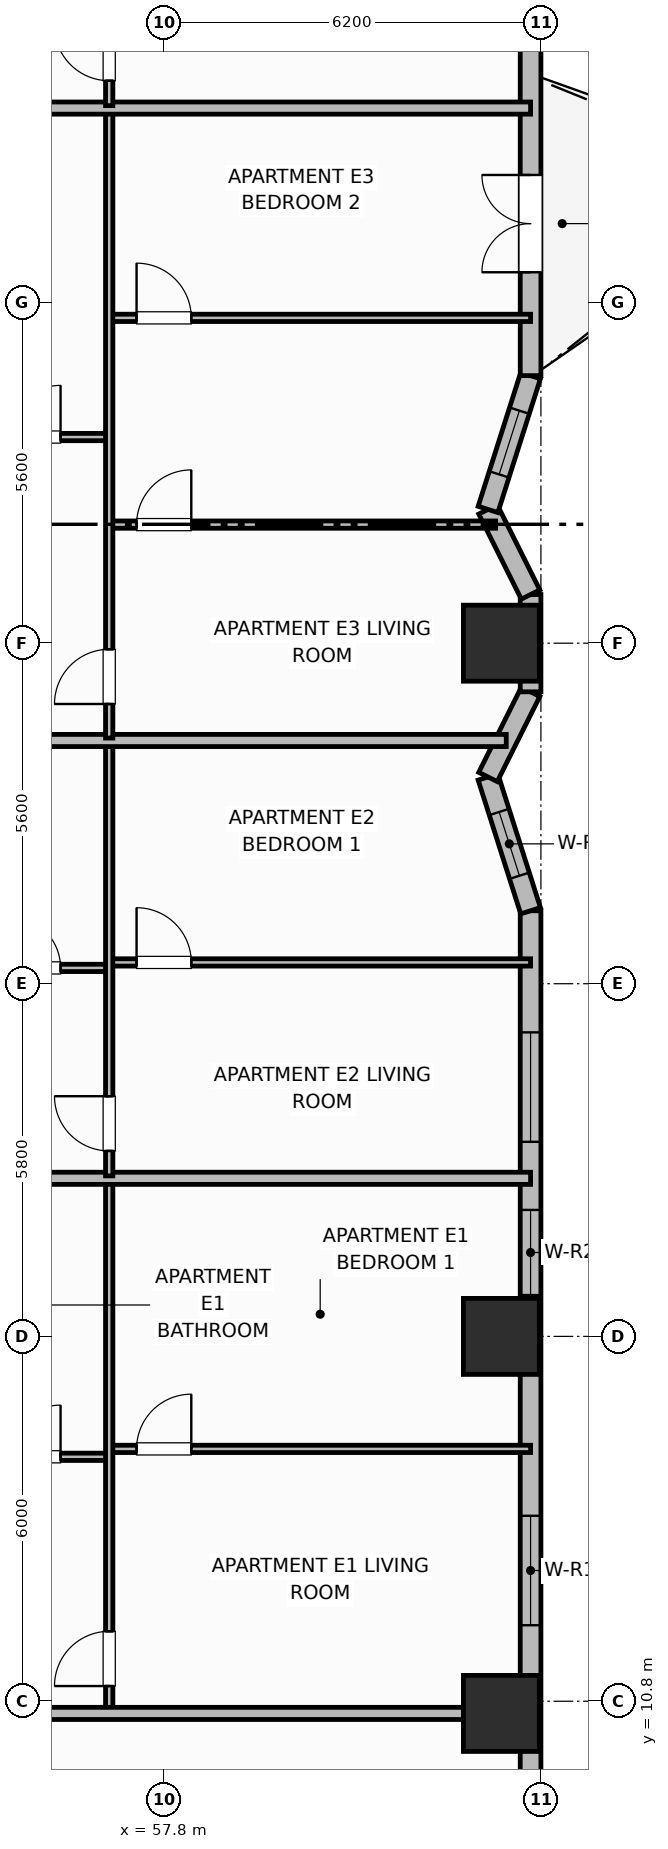
"""IFC4 building model, lengths in metres.
Left out: names, types, materials, properties, quantities, classifications, styles, units other than length and angle.
Written with IfcOpenShell. Run it as: python <this file> out.ifc"""

import sys

from ifc_helpers import new_model, si_unit, direction, frame, frame_2d, origin, origin_2d, place, context, subcontext, project, spatial, rectangle, extrude, element, fill, save


model = new_model("IFC4")
c1 = context("Model", 3, precision=1e-05, world=origin(), true_north=direction((0.0, 1.0)))
c2 = subcontext(c1, "Body", "Model", "MODEL_VIEW")
j1 = project(units=[si_unit("LENGTHUNIT", "METRE"), si_unit("PLANEANGLEUNIT", "RADIAN")], contexts=[c1])
p1 = place(None, origin())
s1 = spatial("IfcSite", under=j1, at=p1, CompositionType="ELEMENT")
p2 = place(p1, origin())
s2 = spatial("IfcBuilding", under=s1, at=p2, CompositionType="ELEMENT")
p3 = place(p2, frame((0.0, 0.0, 58.4)))
s3 = spatial("IfcBuildingStorey", under=s2, at=p3, CompositionType="ELEMENT", Elevation=58.4)
for number, where, z_axis, x_axis in (
    (1, (63.35, 10.6, 0.0), (0.0, 0.0, 1.0), (1.0, 0.0, 0.0)),
    (2, (63.35, 16.8, 0.0), (0.0, 0.0, 1.0), (1.0, 0.0, 0.0)),
    (3, (63.35, 28.2, 0.0), (0.0, 0.0, 1.0), (1.0, 0.0, 0.0)),
):
    element("IfcColumn", number, at=place(p3, frame(where, z_axis=z_axis, x_axis=x_axis)), inside=s3, PredefinedType="COLUMN", context=c2, shape_type="SweptSolid", body=[
        extrude(rectangle(XDim=1.25, YDim=1.25, at=origin_2d()), origin(), (0.0, 0.0, 1.0), 3.7),
    ])
p4 = place(p3, frame((63.83, 9.0, 0.0), z_axis=(0.0, 0.0, 1.0), x_axis=(0.0, 1.0, 0.0)))
e4 = element("IfcWall", 4, at=p4, inside=s3, PredefinedType="SOLIDWALL", context=c2, shape_type="SweptSolid", body=[
    extrude(rectangle(XDim=14.8, YDim=0.34, at=frame_2d((7.4, 0.0))), origin(), (0.0, 0.0, 1.0), 2.7),
])
p5 = place(p4, frame((3.05, 0.0, 0.73)))
e5 = element("IfcOpeningElement", 5, at=p5, cuts=e4, PredefinedType="OPENING", context=c2, shape_type="SweptSolid", body=[
    extrude(rectangle(XDim=1.8, YDim=1.85, at=frame_2d((0.9, 0.925))), frame((0.0, 0.18, 0.0), z_axis=(0.0, -1.0, 0.0), x_axis=(1.0, 0.0, 0.0)), (0.0, 0.0, 1.0), 0.36),
])
p6 = place(p4, frame((8.48, 0.0, 0.69)))
e6 = element("IfcOpeningElement", 6, at=p6, cuts=e4, PredefinedType="OPENING", context=c2, shape_type="SweptSolid", body=[
    extrude(rectangle(XDim=1.4, YDim=1.85, at=frame_2d((0.7, 0.925))), frame((0.0, 0.18, 0.0), z_axis=(0.0, -1.0, 0.0), x_axis=(1.0, 0.0, 0.0)), (0.0, 0.0, 1.0), 0.36),
])
p7 = place(p4, frame((11.0, 0.0, 0.73)))
e7 = element("IfcOpeningElement", 7, at=p7, cuts=e4, PredefinedType="OPENING", context=c2, shape_type="SweptSolid", body=[
    extrude(rectangle(XDim=1.8, YDim=1.85, at=frame_2d((0.9, 0.925))), frame((0.0, 0.18, 0.0), z_axis=(0.0, -1.0, 0.0), x_axis=(1.0, 0.0, 0.0)), (0.0, 0.0, 1.0), 0.36),
])
p8 = place(p3, frame((63.83, 23.8, 0.0), z_axis=(0.0, 0.0, 1.0), x_axis=(-0.303286588318, 0.95289938889, 0.0)))
e8 = element("IfcWall", 8, at=p8, inside=s3, PredefinedType="SOLIDWALL", context=c2, shape_type="SweptSolid", body=[
    extrude(rectangle(XDim=2.309, YDim=0.34, at=frame_2d((1.154, 0.0))), origin(), (0.0, 0.0, 1.0), 2.7),
])
p9 = place(p8, frame((0.604, 0.0, 0.89)))
e9 = element("IfcOpeningElement", 9, at=p9, cuts=e8, PredefinedType="OPENING", context=c2, shape_type="SweptSolid", body=[
    extrude(rectangle(XDim=1.1, YDim=1.65, at=frame_2d((0.55, 0.825))), frame((0.0, 0.18, 0.0), z_axis=(0.0, -1.0, 0.0), x_axis=(1.0, 0.0, 0.0)), (0.0, 0.0, 1.0), 0.36),
])
p10 = place(p3, frame((63.13, 26.0, 0.0), z_axis=(0.0, 0.0, 1.0), x_axis=(0.447338371726, 0.894364792007, 0.0)))
e10 = element("IfcWall", 10, at=p10, inside=s3, PredefinedType="SOLIDWALL", context=c2, shape_type="SweptSolid", body=[
    extrude(rectangle(XDim=1.565, YDim=0.34, at=frame_2d((0.783, 0.0))), origin(), (0.0, 0.0, 1.0), 2.7),
])
p11 = place(p3, frame((63.83, 27.4, 0.0), z_axis=(0.0, 0.0, 1.0), x_axis=(0.0, 1.0, 0.0)))
e11 = element("IfcWall", 11, at=p11, inside=s3, PredefinedType="SOLIDWALL", context=c2, shape_type="SweptSolid", body=[
    extrude(rectangle(XDim=1.6, YDim=0.34, at=frame_2d((0.8, 0.0))), origin(), (0.0, 0.0, 1.0), 2.7),
])
p12 = place(p3, frame((63.83, 29.0, 0.0), z_axis=(0.0, 0.0, 1.0), x_axis=(-0.447338371726, 0.894364792007, 0.0)))
e12 = element("IfcWall", 12, at=p12, inside=s3, PredefinedType="SOLIDWALL", context=c2, shape_type="SweptSolid", body=[
    extrude(rectangle(XDim=1.565, YDim=0.34, at=frame_2d((0.783, 0.0))), origin(), (0.0, 0.0, 1.0), 2.7),
])
p13 = place(p3, frame((63.13, 30.4, 0.0), z_axis=(0.0, 0.0, 1.0), x_axis=(0.303256029766, 0.952909114454, 0.0)))
e13 = element("IfcWall", 13, at=p13, inside=s3, PredefinedType="SOLIDWALL", context=c2, shape_type="SweptSolid", body=[
    extrude(rectangle(XDim=2.309, YDim=0.34, at=frame_2d((1.154, 0.0))), origin(), (0.0, 0.0, 1.0), 2.7),
])
p14 = place(p13, frame((0.604, 0.0, 0.89)))
e14 = element("IfcOpeningElement", 14, at=p14, cuts=e13, PredefinedType="OPENING", context=c2, shape_type="SweptSolid", body=[
    extrude(rectangle(XDim=1.1, YDim=1.65, at=frame_2d((0.55, 0.825))), frame((0.0, 0.18, 0.0), z_axis=(0.0, -1.0, 0.0), x_axis=(1.0, 0.0, 0.0)), (0.0, 0.0, 1.0), 0.36),
])
p15 = place(p3, frame((63.83, 32.6, 0.0), z_axis=(0.0, 0.0, 1.0), x_axis=(0.0, 1.0, 0.0)))
e15 = element("IfcWall", 15, at=p15, inside=s3, PredefinedType="SOLIDWALL", context=c2, shape_type="SweptSolid", body=[
    extrude(rectangle(XDim=14.8, YDim=0.34, at=frame_2d((7.4, 0.0))), origin(), (0.0, 0.0, 1.0), 2.7),
])
p16 = place(p15, frame((1.7, 0.0, 0.0)))
e16 = element("IfcOpeningElement", 16, at=p16, cuts=e15, PredefinedType="OPENING", context=c2, shape_type="SweptSolid", body=[
    extrude(rectangle(XDim=1.6, YDim=2.1, at=frame_2d((0.8, 1.05))), frame((0.0, 0.18, 0.0), z_axis=(0.0, -1.0, 0.0), x_axis=(1.0, 0.0, 0.0)), (0.0, 0.0, 1.0), 0.36),
])
p17 = place(p15, frame((9.337, 0.0, 0.68)))
e17 = element("IfcOpeningElement", 17, at=p17, cuts=e15, PredefinedType="OPENING", context=c2, shape_type="SweptSolid", body=[
    extrude(rectangle(XDim=1.6, YDim=1.9, at=frame_2d((0.8, 0.95))), frame((0.0, 0.18, 0.0), z_axis=(0.0, -1.0, 0.0), x_axis=(1.0, 0.0, 0.0)), (0.0, 0.0, 1.0), 0.36),
])
p18 = place(p3, frame((54.65, 14.82, 0.0), z_axis=(0.0, 0.0, 1.0), x_axis=(1.0, 0.0, 0.0)))
e18 = element("IfcWall", 18, at=p18, inside=s3, PredefinedType="PARTITIONING", context=c2, shape_type="SweptSolid", body=[
    extrude(rectangle(XDim=2.25, YDim=0.12, at=frame_2d((1.125, 0.0))), origin(), (0.0, 0.0, 1.0), 2.53),
])
p19 = place(p18, frame((0.6, 0.0, 0.0)))
e19 = element("IfcOpeningElement", 19, at=p19, cuts=e18, PredefinedType="OPENING", context=c2, shape_type="SweptSolid", body=[
    extrude(rectangle(XDim=0.85, YDim=2.1, at=frame_2d((0.425, 1.05))), frame((0.0, 0.07, 0.0), z_axis=(0.0, -1.0, 0.0), x_axis=(1.0, 0.0, 0.0)), (0.0, 0.0, 1.0), 0.14),
])
p20 = place(p3, frame((56.9, 14.95, 0.0), z_axis=(0.0, 0.0, 1.0), x_axis=(1.0, 0.0, 0.0)))
e20 = element("IfcWall", 20, at=p20, inside=s3, PredefinedType="PARTITIONING", context=c2, shape_type="SweptSolid", body=[
    extrude(rectangle(XDim=6.93, YDim=0.12, at=frame_2d((3.465, 0.0))), origin(), (0.0, 0.0, 1.0), 2.53),
])
p21 = place(p20, frame((0.45, 0.0, 0.0)))
e21 = element("IfcOpeningElement", 21, at=p21, cuts=e20, PredefinedType="OPENING", context=c2, shape_type="SweptSolid", body=[
    extrude(rectangle(XDim=0.9, YDim=2.1, at=frame_2d((0.45, 1.05))), frame((0.0, 0.07, 0.0), z_axis=(0.0, -1.0, 0.0), x_axis=(1.0, 0.0, 0.0)), (0.0, 0.0, 1.0), 0.14),
])
p22 = place(p3, frame((56.9, 10.64, 0.0), z_axis=(0.0, 0.0, 1.0), x_axis=(0.0, 1.0, 0.0)))
e22 = element("IfcWall", 22, at=p22, inside=s3, PredefinedType="PARTITIONING", context=c2, shape_type="SweptSolid", body=[
    extrude(rectangle(XDim=8.72, YDim=0.12, at=frame_2d((4.36, 0.0))), origin(), (0.0, 0.0, 1.0), 2.53),
])
p23 = place(p22, frame((0.41, 0.0, 0.0)))
e23 = element("IfcOpeningElement", 23, at=p23, cuts=e22, PredefinedType="OPENING", context=c2, shape_type="SweptSolid", body=[
    extrude(rectangle(XDim=0.9, YDim=2.1, at=frame_2d((0.45, 1.05))), frame((0.0, 0.07, 0.0), z_axis=(0.0, -1.0, 0.0), x_axis=(1.0, 0.0, 0.0)), (0.0, 0.0, 1.0), 0.14),
])
p24 = place(p3, frame((54.65, 19.4, 0.0), z_axis=(0.0, 0.0, 1.0), x_axis=(1.0, 0.0, 0.0)))
e24 = element("IfcWall", 24, at=p24, inside=s3, PredefinedType="PARTITIONING", context=c2, shape_type="SweptSolid", body=[
    extrude(rectangle(XDim=9.18, YDim=0.2, at=frame_2d((4.59, 0.0))), origin(), (0.0, 0.0, 1.0), 2.53),
])
p25 = place(p3, frame((54.65, 22.86, 0.0), z_axis=(0.0, 0.0, 1.0), x_axis=(1.0, 0.0, 0.0)))
e25 = element("IfcWall", 25, at=p25, inside=s3, PredefinedType="PARTITIONING", context=c2, shape_type="SweptSolid", body=[
    extrude(rectangle(XDim=2.25, YDim=0.12, at=frame_2d((1.125, 0.0))), origin(), (0.0, 0.0, 1.0), 2.53),
])
p26 = place(p25, frame((0.6, 0.0, 0.0)))
e26 = element("IfcOpeningElement", 26, at=p26, cuts=e25, PredefinedType="OPENING", context=c2, shape_type="SweptSolid", body=[
    extrude(rectangle(XDim=0.85, YDim=2.1, at=frame_2d((0.425, 1.05))), frame((0.0, 0.07, 0.0), z_axis=(0.0, -1.0, 0.0), x_axis=(1.0, 0.0, 0.0)), (0.0, 0.0, 1.0), 0.14),
])
p27 = place(p3, frame((56.9, 22.95, 0.0), z_axis=(0.0, 0.0, 1.0), x_axis=(1.0, 0.0, 0.0)))
e27 = element("IfcWall", 27, at=p27, inside=s3, PredefinedType="PARTITIONING", context=c2, shape_type="SweptSolid", body=[
    extrude(rectangle(XDim=6.93, YDim=0.12, at=frame_2d((3.465, 0.0))), origin(), (0.0, 0.0, 1.0), 2.53),
])
p28 = place(p27, frame((0.45, 0.0, 0.0)))
e28 = element("IfcOpeningElement", 28, at=p28, cuts=e27, PredefinedType="OPENING", context=c2, shape_type="SweptSolid", body=[
    extrude(rectangle(XDim=0.9, YDim=2.1, at=frame_2d((0.45, 1.05))), frame((0.0, 0.07, 0.0), z_axis=(0.0, -1.0, 0.0), x_axis=(1.0, 0.0, 0.0)), (0.0, 0.0, 1.0), 0.14),
])
p29 = place(p3, frame((56.9, 19.44, 0.0), z_axis=(0.0, 0.0, 1.0), x_axis=(0.0, 1.0, 0.0)))
e29 = element("IfcWall", 29, at=p29, inside=s3, PredefinedType="PARTITIONING", context=c2, shape_type="SweptSolid", body=[
    extrude(rectangle(XDim=7.12, YDim=0.12, at=frame_2d((3.56, 0.0))), origin(), (0.0, 0.0, 1.0), 2.53),
])
p30 = place(p29, frame((0.41, 0.0, 0.0)))
e30 = element("IfcOpeningElement", 30, at=p30, cuts=e29, PredefinedType="OPENING", context=c2, shape_type="SweptSolid", body=[
    extrude(rectangle(XDim=0.9, YDim=2.1, at=frame_2d((0.45, 1.05))), frame((0.0, 0.07, 0.0), z_axis=(0.0, -1.0, 0.0), x_axis=(1.0, 0.0, 0.0)), (0.0, 0.0, 1.0), 0.14),
])
p31 = place(p3, frame((54.65, 26.6, 0.0), z_axis=(0.0, 0.0, 1.0), x_axis=(1.0, 0.0, 0.0)))
e31 = element("IfcWall", 31, at=p31, inside=s3, PredefinedType="PARTITIONING", context=c2, shape_type="SweptSolid", body=[
    extrude(rectangle(XDim=8.78, YDim=0.2, at=frame_2d((4.39, 0.0))), origin(), (0.0, 0.0, 1.0), 2.53),
])
p32 = place(p3, frame((54.65, 31.59, 0.0), z_axis=(0.0, 0.0, 1.0), x_axis=(1.0, 0.0, 0.0)))
e32 = element("IfcWall", 32, at=p32, inside=s3, PredefinedType="PARTITIONING", context=c2, shape_type="SweptSolid", body=[
    extrude(rectangle(XDim=2.25, YDim=0.12, at=frame_2d((1.125, 0.0))), origin(), (0.0, 0.0, 1.0), 2.53),
])
p33 = place(p32, frame((0.6, 0.0, 0.0)))
e33 = element("IfcOpeningElement", 33, at=p33, cuts=e32, PredefinedType="OPENING", context=c2, shape_type="SweptSolid", body=[
    extrude(rectangle(XDim=0.85, YDim=2.1, at=frame_2d((0.425, 1.05))), frame((0.0, 0.07, 0.0), z_axis=(0.0, -1.0, 0.0), x_axis=(1.0, 0.0, 0.0)), (0.0, 0.0, 1.0), 0.14),
])
p34 = place(p3, frame((56.9, 30.15, 0.0), z_axis=(0.0, 0.0, 1.0), x_axis=(1.0, 0.0, 0.0)))
e34 = element("IfcWall", 34, at=p34, inside=s3, PredefinedType="PARTITIONING", context=c2, shape_type="SweptSolid", body=[
    extrude(rectangle(XDim=6.355, YDim=0.12, at=frame_2d((3.177, 0.0))), origin(), (0.0, 0.0, 1.0), 2.53),
])
p35 = place(p34, frame((0.45, 0.0, 0.0)))
e35 = element("IfcOpeningElement", 35, at=p35, cuts=e34, PredefinedType="OPENING", context=c2, shape_type="SweptSolid", body=[
    extrude(rectangle(XDim=0.9, YDim=2.1, at=frame_2d((0.45, 1.05))), frame((0.0, 0.07, 0.0), z_axis=(0.0, -1.0, 0.0), x_axis=(1.0, 0.0, 0.0)), (0.0, 0.0, 1.0), 0.14),
])
p36 = place(p3, frame((56.9, 33.55, 0.0), z_axis=(0.0, 0.0, 1.0), x_axis=(1.0, 0.0, 0.0)))
e36 = element("IfcWall", 36, at=p36, inside=s3, PredefinedType="PARTITIONING", context=c2, shape_type="SweptSolid", body=[
    extrude(rectangle(XDim=6.93, YDim=0.12, at=frame_2d((3.465, 0.0))), origin(), (0.0, 0.0, 1.0), 2.53),
])
p37 = place(p36, frame((0.45, 0.0, 0.0)))
e37 = element("IfcOpeningElement", 37, at=p37, cuts=e36, PredefinedType="OPENING", context=c2, shape_type="SweptSolid", body=[
    extrude(rectangle(XDim=0.9, YDim=2.1, at=frame_2d((0.45, 1.05))), frame((0.0, 0.07, 0.0), z_axis=(0.0, -1.0, 0.0), x_axis=(1.0, 0.0, 0.0)), (0.0, 0.0, 1.0), 0.14),
])
p38 = place(p3, frame((56.9, 26.64, 0.0), z_axis=(0.0, 0.0, 1.0), x_axis=(0.0, 1.0, 0.0)))
e38 = element("IfcWall", 38, at=p38, inside=s3, PredefinedType="PARTITIONING", context=c2, shape_type="SweptSolid", body=[
    extrude(rectangle(XDim=10.32, YDim=0.12, at=frame_2d((5.16, 0.0))), origin(), (0.0, 0.0, 1.0), 2.53),
])
p39 = place(p38, frame((0.56, 0.0, 0.0)))
e39 = element("IfcOpeningElement", 39, at=p39, cuts=e38, PredefinedType="OPENING", context=c2, shape_type="SweptSolid", body=[
    extrude(rectangle(XDim=0.9, YDim=2.1, at=frame_2d((0.45, 1.05))), frame((0.0, 0.07, 0.0), z_axis=(0.0, -1.0, 0.0), x_axis=(1.0, 0.0, 0.0)), (0.0, 0.0, 1.0), 0.14),
])
p40 = place(p3, frame((54.65, 37.0, 0.0), z_axis=(0.0, 0.0, 1.0), x_axis=(1.0, 0.0, 0.0)))
e40 = element("IfcWall", 40, at=p40, inside=s3, PredefinedType="PARTITIONING", context=c2, shape_type="SweptSolid", body=[
    extrude(rectangle(XDim=9.18, YDim=0.2, at=frame_2d((4.59, 0.0))), origin(), (0.0, 0.0, 1.0), 2.53),
])
p41 = place(p3, frame((56.9, 37.04, 0.0), z_axis=(0.0, 0.0, 1.0), x_axis=(0.0, 1.0, 0.0)))
e41 = element("IfcWall", 41, at=p41, inside=s3, PredefinedType="PARTITIONING", context=c2, shape_type="SweptSolid", body=[
    extrude(rectangle(XDim=8.72, YDim=0.12, at=frame_2d((4.36, 0.0))), origin(), (0.0, 0.0, 1.0), 2.53),
])
p42 = place(p41, frame((0.41, 0.0, 0.0)))
e42 = element("IfcOpeningElement", 42, at=p42, cuts=e41, PredefinedType="OPENING", context=c2, shape_type="SweptSolid", body=[
    extrude(rectangle(XDim=0.9, YDim=2.1, at=frame_2d((0.45, 1.05))), frame((0.0, 0.07, 0.0), z_axis=(0.0, -1.0, 0.0), x_axis=(1.0, 0.0, 0.0)), (0.0, 0.0, 1.0), 0.14),
])
p43 = place(p3, frame((54.65, 10.6, 0.0), z_axis=(0.0, 0.0, 1.0), x_axis=(1.0, 0.0, 0.0)))
e43 = element("IfcWall", 43, at=p43, inside=s3, PredefinedType="PARTITIONING", context=c2, shape_type="SweptSolid", body=[
    extrude(rectangle(XDim=8.76, YDim=0.2, at=frame_2d((4.38, 0.0))), origin(), (0.0, 0.0, 1.0), 2.53),
])
p44 = place(p5, origin())
e44 = element("IfcWindow", 44, at=p44, inside=s3, PartitioningType="SINGLE_PANEL", PredefinedType="WINDOW", context=c2, shape_type="SweptSolid", body=[
    extrude(rectangle(XDim=1.8, YDim=1.85, at=frame_2d((0.9, 0.925))), frame((0.0, 0.03, 0.0), z_axis=(0.0, -1.0, 0.0), x_axis=(1.0, 0.0, 0.0)), (0.0, 0.0, 1.0), 0.06),
])
fill(e5, e44)
p45 = place(p6, origin())
e45 = element("IfcWindow", 45, at=p45, inside=s3, PartitioningType="SINGLE_PANEL", PredefinedType="WINDOW", context=c2, shape_type="SweptSolid", body=[
    extrude(rectangle(XDim=1.4, YDim=1.85, at=frame_2d((0.7, 0.925))), frame((0.0, 0.03, 0.0), z_axis=(0.0, -1.0, 0.0), x_axis=(1.0, 0.0, 0.0)), (0.0, 0.0, 1.0), 0.06),
])
fill(e6, e45)
p46 = place(p7, origin())
e46 = element("IfcWindow", 46, at=p46, inside=s3, PartitioningType="SINGLE_PANEL", PredefinedType="WINDOW", context=c2, shape_type="SweptSolid", body=[
    extrude(rectangle(XDim=1.8, YDim=1.85, at=frame_2d((0.9, 0.925))), frame((0.0, 0.03, 0.0), z_axis=(0.0, -1.0, 0.0), x_axis=(1.0, 0.0, 0.0)), (0.0, 0.0, 1.0), 0.06),
])
fill(e7, e46)
p47 = place(p9, origin())
e47 = element("IfcWindow", 47, at=p47, inside=s3, PartitioningType="SINGLE_PANEL", PredefinedType="WINDOW", context=c2, shape_type="SweptSolid", body=[
    extrude(rectangle(XDim=1.1, YDim=1.65, at=frame_2d((0.55, 0.825))), frame((0.0, 0.03, 0.0), z_axis=(0.0, -1.0, 0.0), x_axis=(1.0, 0.0, 0.0)), (0.0, 0.0, 1.0), 0.06),
])
fill(e9, e47)
p48 = place(p14, origin())
e48 = element("IfcWindow", 48, at=p48, inside=s3, PartitioningType="SINGLE_PANEL", PredefinedType="WINDOW", context=c2, shape_type="SweptSolid", body=[
    extrude(rectangle(XDim=1.1, YDim=1.65, at=frame_2d((0.55, 0.825))), frame((0.0, 0.03, 0.0), z_axis=(0.0, -1.0, 0.0), x_axis=(1.0, 0.0, 0.0)), (0.0, 0.0, 1.0), 0.06),
])
fill(e14, e48)
p49 = place(p16, origin())
e49 = element("IfcDoor", 49, at=p49, inside=s3, OperationType="DOUBLE_DOOR_SINGLE_SWING", PredefinedType="DOOR", context=c2, shape_type="SweptSolid", body=[
    extrude(rectangle(XDim=1.6, YDim=2.1, at=frame_2d((0.8, 1.05))), frame((0.0, 0.025, 0.0), z_axis=(0.0, -1.0, 0.0), x_axis=(1.0, 0.0, 0.0)), (0.0, 0.0, 1.0), 0.05),
])
fill(e16, e49)
p50 = place(p19, origin())
e50 = element("IfcDoor", 50, at=p50, inside=s3, OperationType="SINGLE_SWING_RIGHT", PredefinedType="DOOR", context=c2, shape_type="SweptSolid", body=[
    extrude(rectangle(XDim=0.85, YDim=2.1, at=frame_2d((0.425, 1.05))), frame((0.0, 0.025, 0.0), z_axis=(0.0, -1.0, 0.0), x_axis=(1.0, 0.0, 0.0)), (0.0, 0.0, 1.0), 0.05),
])
fill(e19, e50)
p51 = place(p21, origin())
e51 = element("IfcDoor", 51, at=p51, inside=s3, OperationType="SINGLE_SWING_RIGHT", PredefinedType="DOOR", context=c2, shape_type="SweptSolid", body=[
    extrude(rectangle(XDim=0.9, YDim=2.1, at=frame_2d((0.45, 1.05))), frame((0.0, 0.025, 0.0), z_axis=(0.0, -1.0, 0.0), x_axis=(1.0, 0.0, 0.0)), (0.0, 0.0, 1.0), 0.05),
])
fill(e21, e51)
p52 = place(p23, origin())
e52 = element("IfcDoor", 52, at=p52, inside=s3, OperationType="SINGLE_SWING_LEFT", PredefinedType="DOOR", context=c2, shape_type="SweptSolid", body=[
    extrude(rectangle(XDim=0.9, YDim=2.1, at=frame_2d((0.45, 1.05))), frame((0.0, 0.025, 0.0), z_axis=(0.0, -1.0, 0.0), x_axis=(1.0, 0.0, 0.0)), (0.0, 0.0, 1.0), 0.05),
])
fill(e23, e52)
p53 = place(p26, origin())
e53 = element("IfcDoor", 53, at=p53, inside=s3, OperationType="SINGLE_SWING_LEFT", PredefinedType="DOOR", context=c2, shape_type="SweptSolid", body=[
    extrude(rectangle(XDim=0.85, YDim=2.1, at=frame_2d((0.425, 1.05))), frame((0.0, 0.025, 0.0), z_axis=(0.0, -1.0, 0.0), x_axis=(1.0, 0.0, 0.0)), (0.0, 0.0, 1.0), 0.05),
])
fill(e26, e53)
p54 = place(p28, origin())
e54 = element("IfcDoor", 54, at=p54, inside=s3, OperationType="SINGLE_SWING_LEFT", PredefinedType="DOOR", context=c2, shape_type="SweptSolid", body=[
    extrude(rectangle(XDim=0.9, YDim=2.1, at=frame_2d((0.45, 1.05))), frame((0.0, 0.025, 0.0), z_axis=(0.0, -1.0, 0.0), x_axis=(1.0, 0.0, 0.0)), (0.0, 0.0, 1.0), 0.05),
])
fill(e28, e54)
p55 = place(p30, origin())
e55 = element("IfcDoor", 55, at=p55, inside=s3, OperationType="SINGLE_SWING_RIGHT", PredefinedType="DOOR", context=c2, shape_type="SweptSolid", body=[
    extrude(rectangle(XDim=0.9, YDim=2.1, at=frame_2d((0.45, 1.05))), frame((0.0, 0.025, 0.0), z_axis=(0.0, -1.0, 0.0), x_axis=(1.0, 0.0, 0.0)), (0.0, 0.0, 1.0), 0.05),
])
fill(e30, e55)
p56 = place(p33, origin())
e56 = element("IfcDoor", 56, at=p56, inside=s3, OperationType="SINGLE_SWING_RIGHT", PredefinedType="DOOR", context=c2, shape_type="SweptSolid", body=[
    extrude(rectangle(XDim=0.85, YDim=2.1, at=frame_2d((0.425, 1.05))), frame((0.0, 0.025, 0.0), z_axis=(0.0, -1.0, 0.0), x_axis=(1.0, 0.0, 0.0)), (0.0, 0.0, 1.0), 0.05),
])
fill(e33, e56)
p57 = place(p35, origin())
e57 = element("IfcDoor", 57, at=p57, inside=s3, OperationType="SINGLE_SWING_RIGHT", PredefinedType="DOOR", context=c2, shape_type="SweptSolid", body=[
    extrude(rectangle(XDim=0.9, YDim=2.1, at=frame_2d((0.45, 1.05))), frame((0.0, 0.025, 0.0), z_axis=(0.0, -1.0, 0.0), x_axis=(1.0, 0.0, 0.0)), (0.0, 0.0, 1.0), 0.05),
])
fill(e35, e57)
p58 = place(p37, origin())
e58 = element("IfcDoor", 58, at=p58, inside=s3, OperationType="SINGLE_SWING_LEFT", PredefinedType="DOOR", context=c2, shape_type="SweptSolid", body=[
    extrude(rectangle(XDim=0.9, YDim=2.1, at=frame_2d((0.45, 1.05))), frame((0.0, 0.025, 0.0), z_axis=(0.0, -1.0, 0.0), x_axis=(1.0, 0.0, 0.0)), (0.0, 0.0, 1.0), 0.05),
])
fill(e37, e58)
p59 = place(p39, origin())
e59 = element("IfcDoor", 59, at=p59, inside=s3, OperationType="SINGLE_SWING_LEFT", PredefinedType="DOOR", context=c2, shape_type="SweptSolid", body=[
    extrude(rectangle(XDim=0.9, YDim=2.1, at=frame_2d((0.45, 1.05))), frame((0.0, 0.025, 0.0), z_axis=(0.0, -1.0, 0.0), x_axis=(1.0, 0.0, 0.0)), (0.0, 0.0, 1.0), 0.05),
])
fill(e39, e59)
p60 = place(p42, origin())
e60 = element("IfcDoor", 60, at=p60, inside=s3, OperationType="SINGLE_SWING_RIGHT", PredefinedType="DOOR", context=c2, shape_type="SweptSolid", body=[
    extrude(rectangle(XDim=0.9, YDim=2.1, at=frame_2d((0.45, 1.05))), frame((0.0, 0.025, 0.0), z_axis=(0.0, -1.0, 0.0), x_axis=(1.0, 0.0, 0.0)), (0.0, 0.0, 1.0), 0.05),
])
fill(e42, e60)
save(model, sys.argv[1])
